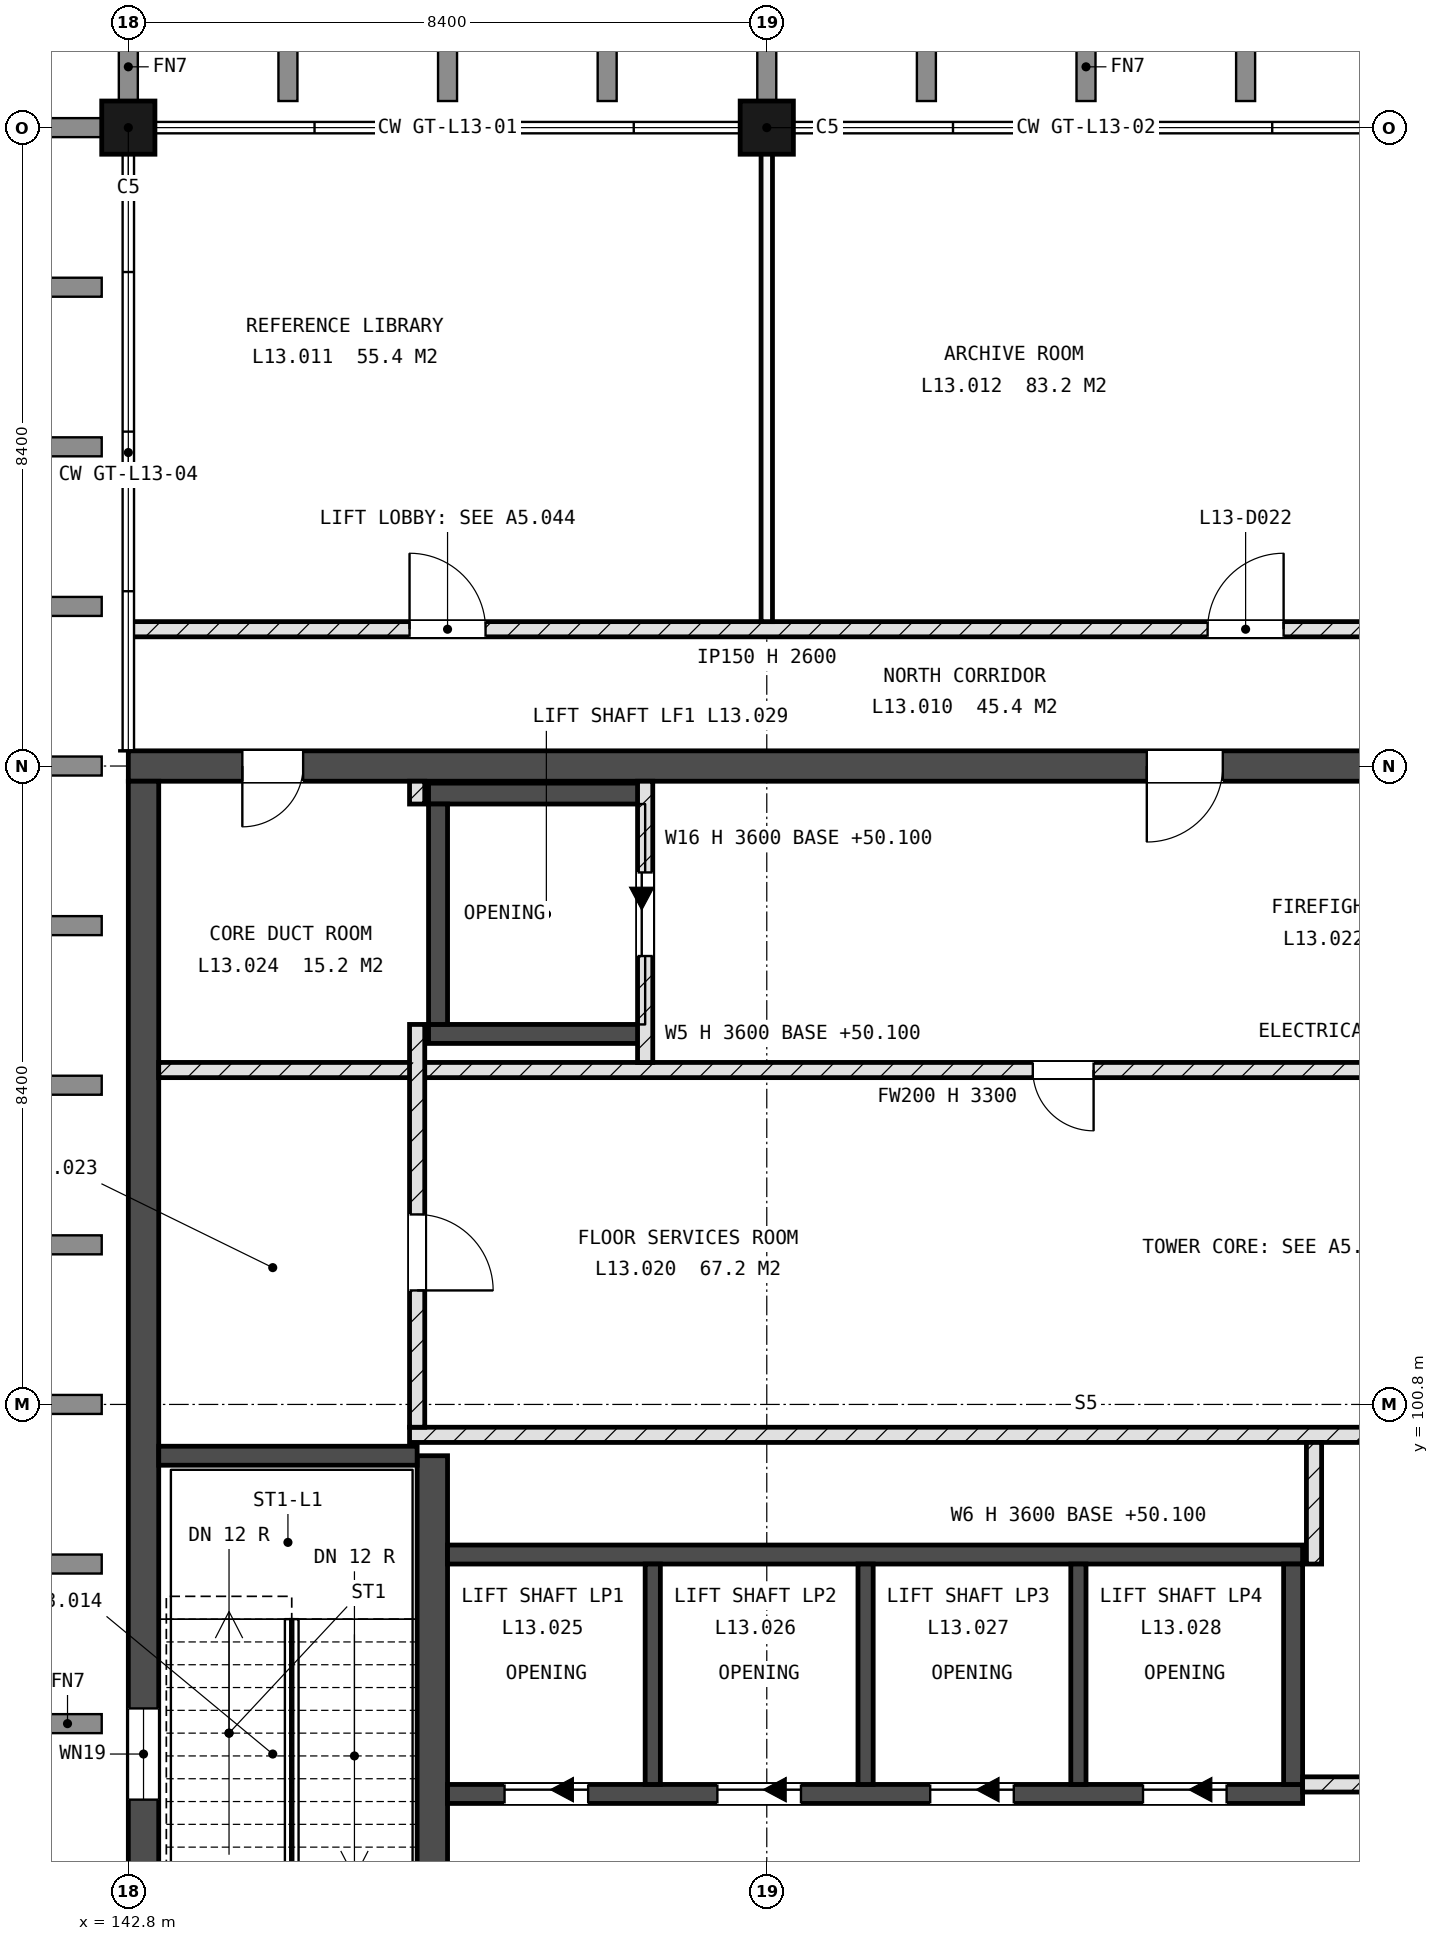
"""IFC4 building model, lengths in metres.
Left out: names, types, materials, properties, quantities, classifications, styles, units other than length and angle.
Written with IfcOpenShell. Run it as: python <this file> out.ifc"""

import sys

from ifc_helpers import new_model, si_unit, direction, frame, frame_2d, origin, origin_2d, place, context, subcontext, project, spatial, rectangle, extrude, element, fill, save


model = new_model("IFC4")
c1 = context("Model", 3, precision=1e-05, world=origin(), true_north=direction((0.0, 1.0)))
c2 = subcontext(c1, "Body", "Model", "MODEL_VIEW")
j1 = project(units=[si_unit("LENGTHUNIT", "METRE"), si_unit("PLANEANGLEUNIT", "RADIAN")], contexts=[c1])
p1 = place(None, origin())
s1 = spatial("IfcSite", under=j1, at=p1, CompositionType="ELEMENT")
p2 = place(p1, origin())
s2 = spatial("IfcBuilding", under=s1, at=p2, CompositionType="ELEMENT")
p3 = place(p2, frame((0.0, 0.0, 50.4)))
s3 = spatial("IfcBuildingStorey", under=s2, at=p3, CompositionType="ELEMENT", Elevation=50.4)
for number, where, z_axis, x_axis in (
    (1, (142.8, 117.6, -0.3), (0.0, 0.0, 1.0), (1.0, 0.0, 0.0)),
    (2, (151.2, 117.6, -0.3), (0.0, 0.0, 1.0), (1.0, 0.0, 0.0)),
):
    element("IfcColumn", number, at=place(p3, frame(where, z_axis=z_axis, x_axis=x_axis)), inside=s3, PredefinedType="COLUMN", context=c2, shape_type="SweptSolid", body=[
        extrude(rectangle(XDim=0.7, YDim=0.7, at=origin_2d()), origin(), (0.0, 0.0, 1.0), 3.6),
    ])
p4 = place(p3, frame((142.8, 109.2, -0.3), z_axis=(0.0, 0.0, 1.0), x_axis=(1.0, 0.0, 0.0)))
e3 = element("IfcWall", 3, at=p4, inside=s3, PredefinedType="SHEAR", context=c2, shape_type="SweptSolid", body=[
    extrude(rectangle(XDim=25.2, YDim=0.4, at=frame_2d((12.6, 0.0))), origin(), (0.0, 0.0, 1.0), 3.6),
])
p5 = place(p4, frame((22.8, 0.0, 0.3)))
e4 = element("IfcOpeningElement", 4, at=p5, cuts=e3, PredefinedType="OPENING", context=c2, shape_type="SweptSolid", body=[
    extrude(rectangle(XDim=1.0, YDim=2.1, at=frame_2d((0.5, 1.05))), frame((0.0, 0.21, 0.0), z_axis=(0.0, -1.0, 0.0), x_axis=(1.0, 0.0, 0.0)), (0.0, 0.0, 1.0), 0.42),
])
p6 = place(p4, frame((1.5, 0.0, 0.3)))
e5 = element("IfcOpeningElement", 5, at=p6, cuts=e3, PredefinedType="OPENING", context=c2, shape_type="SweptSolid", body=[
    extrude(rectangle(XDim=0.8, YDim=2.1, at=frame_2d((0.4, 1.05))), frame((0.0, 0.21, 0.0), z_axis=(0.0, -1.0, 0.0), x_axis=(1.0, 0.0, 0.0)), (0.0, 0.0, 1.0), 0.42),
])
p7 = place(p4, frame((13.4, 0.0, 0.3)))
e6 = element("IfcOpeningElement", 6, at=p7, cuts=e3, PredefinedType="OPENING", context=c2, shape_type="SweptSolid", body=[
    extrude(rectangle(XDim=1.0, YDim=2.1, at=frame_2d((0.5, 1.05))), frame((0.0, 0.21, 0.0), z_axis=(0.0, -1.0, 0.0), x_axis=(1.0, 0.0, 0.0)), (0.0, 0.0, 1.0), 0.42),
])
p8 = place(p3, frame((143.0, 92.6, -0.3), z_axis=(0.0, 0.0, 1.0), x_axis=(0.0, 1.0, 0.0)))
e7 = element("IfcWall", 7, at=p8, inside=s3, PredefinedType="SHEAR", context=c2, shape_type="SweptSolid", body=[
    extrude(rectangle(XDim=16.4, YDim=0.4, at=frame_2d((8.2, 0.0))), origin(), (0.0, 0.0, 1.0), 3.6),
])
p9 = place(p8, frame((3.0, 0.0, 1.9)))
e8 = element("IfcOpeningElement", 8, at=p9, cuts=e7, PredefinedType="OPENING", context=c2, shape_type="SweptSolid", body=[
    extrude(rectangle(XDim=1.2, YDim=0.9, at=frame_2d((0.6, 0.45))), frame((0.0, 0.21, 0.0), z_axis=(0.0, -1.0, 0.0), x_axis=(1.0, 0.0, 0.0)), (0.0, 0.0, 1.0), 0.42),
])
p10 = place(p3, frame((146.8, 92.6, -0.3), z_axis=(0.0, 0.0, 1.0), x_axis=(0.0, 1.0, 0.0)))
e9 = element("IfcWall", 9, at=p10, inside=s3, PredefinedType="SHEAR", context=c2, shape_type="SweptSolid", body=[
    extrude(rectangle(XDim=7.525, YDim=0.4, at=frame_2d((3.762, 0.0))), origin(), (0.0, 0.0, 1.0), 3.6),
])
p11 = place(p10, frame((0.1, 0.0, 0.3)))
e10 = element("IfcOpeningElement", 10, at=p11, cuts=e9, PredefinedType="OPENING", context=c2, shape_type="SweptSolid", body=[
    extrude(rectangle(XDim=1.0, YDim=2.1, at=frame_2d((0.5, 1.05))), frame((0.0, 0.21, 0.0), z_axis=(0.0, -1.0, 0.0), x_axis=(1.0, 0.0, 0.0)), (0.0, 0.0, 1.0), 0.42),
])
p12 = place(p3, frame((143.2, 100.125, -0.3), z_axis=(0.0, 0.0, 1.0), x_axis=(1.0, 0.0, 0.0)))
e11 = element("IfcWall", 11, at=p12, inside=s3, PredefinedType="SHEAR", context=c2, shape_type="SweptSolid", body=[
    extrude(rectangle(XDim=3.4, YDim=0.25, at=frame_2d((1.7, 0.0))), origin(), (0.0, 0.0, 1.0), 3.6),
])
p13 = place(p3, frame((147.0, 95.675, -0.3), z_axis=(0.0, 0.0, 1.0), x_axis=(1.0, 0.0, 0.0)))
e12 = element("IfcWall", 12, at=p13, inside=s3, PredefinedType="SHEAR", context=c2, shape_type="SweptSolid", body=[
    extrude(rectangle(XDim=11.25, YDim=0.25, at=frame_2d((5.625, 0.0))), origin(), (0.0, 0.0, 1.0), 3.6),
])
p14 = place(p13, frame((0.75, 0.0, 0.3)))
e13 = element("IfcOpeningElement", 13, at=p14, cuts=e12, PredefinedType="OPENING", context=c2, shape_type="SweptSolid", body=[
    extrude(rectangle(XDim=1.1, YDim=2.1, at=frame_2d((0.55, 1.05))), frame((0.0, 0.135, 0.0), z_axis=(0.0, -1.0, 0.0), x_axis=(1.0, 0.0, 0.0)), (0.0, 0.0, 1.0), 0.27),
])
p15 = place(p13, frame((3.55, 0.0, 0.3)))
e14 = element("IfcOpeningElement", 14, at=p15, cuts=e12, PredefinedType="OPENING", context=c2, shape_type="SweptSolid", body=[
    extrude(rectangle(XDim=1.1, YDim=2.1, at=frame_2d((0.55, 1.05))), frame((0.0, 0.135, 0.0), z_axis=(0.0, -1.0, 0.0), x_axis=(1.0, 0.0, 0.0)), (0.0, 0.0, 1.0), 0.27),
])
p16 = place(p13, frame((6.35, 0.0, 0.3)))
e15 = element("IfcOpeningElement", 15, at=p16, cuts=e12, PredefinedType="OPENING", context=c2, shape_type="SweptSolid", body=[
    extrude(rectangle(XDim=1.1, YDim=2.1, at=frame_2d((0.55, 1.05))), frame((0.0, 0.135, 0.0), z_axis=(0.0, -1.0, 0.0), x_axis=(1.0, 0.0, 0.0)), (0.0, 0.0, 1.0), 0.27),
])
p17 = place(p13, frame((9.15, 0.0, 0.3)))
e16 = element("IfcOpeningElement", 16, at=p17, cuts=e12, PredefinedType="OPENING", context=c2, shape_type="SweptSolid", body=[
    extrude(rectangle(XDim=1.1, YDim=2.1, at=frame_2d((0.55, 1.05))), frame((0.0, 0.135, 0.0), z_axis=(0.0, -1.0, 0.0), x_axis=(1.0, 0.0, 0.0)), (0.0, 0.0, 1.0), 0.27),
])
p18 = place(p3, frame((147.0, 98.825, -0.3), z_axis=(0.0, 0.0, 1.0), x_axis=(1.0, 0.0, 0.0)))
e17 = element("IfcWall", 17, at=p18, inside=s3, PredefinedType="SHEAR", context=c2, shape_type="SweptSolid", body=[
    extrude(rectangle(XDim=11.25, YDim=0.25, at=frame_2d((5.625, 0.0))), origin(), (0.0, 0.0, 1.0), 3.6),
])
p19 = place(p3, frame((158.125, 95.8, -0.3), z_axis=(0.0, 0.0, 1.0), x_axis=(0.0, 1.0, 0.0)))
e18 = element("IfcWall", 18, at=p19, inside=s3, PredefinedType="SHEAR", context=c2, shape_type="SweptSolid", body=[
    extrude(rectangle(XDim=2.9, YDim=0.25, at=frame_2d((1.45, 0.0))), origin(), (0.0, 0.0, 1.0), 3.6),
])
for number, where, z_axis, x_axis in (
    (19, (149.7, 95.8, -0.3), (0.0, 0.0, 1.0), (0.0, 1.0, 0.0)),
    (20, (152.5, 95.8, -0.3), (0.0, 0.0, 1.0), (0.0, 1.0, 0.0)),
    (21, (155.3, 95.8, -0.3), (0.0, 0.0, 1.0), (0.0, 1.0, 0.0)),
):
    element("IfcWall", number, at=place(p3, frame(where, z_axis=z_axis, x_axis=x_axis)), inside=s3, PredefinedType="SHEAR", context=c2, shape_type="SweptSolid", body=[
        extrude(rectangle(XDim=2.9, YDim=0.2, at=frame_2d((1.45, 0.0))), origin(), (0.0, 0.0, 1.0), 3.6),
    ])
p20 = place(p3, frame((146.75, 105.675, -0.3), z_axis=(0.0, 0.0, 1.0), x_axis=(1.0, 0.0, 0.0)))
e22 = element("IfcWall", 22, at=p20, inside=s3, PredefinedType="SHEAR", context=c2, shape_type="SweptSolid", body=[
    extrude(rectangle(XDim=2.85, YDim=0.25, at=frame_2d((1.425, 0.0))), origin(), (0.0, 0.0, 1.0), 3.6),
])
p21 = place(p3, frame((146.75, 108.837, -0.3), z_axis=(0.0, 0.0, 1.0), x_axis=(1.0, 0.0, 0.0)))
e23 = element("IfcWall", 23, at=p21, inside=s3, PredefinedType="SHEAR", context=c2, shape_type="SweptSolid", body=[
    extrude(rectangle(XDim=2.85, YDim=0.275, at=frame_2d((1.425, 0.0))), origin(), (0.0, 0.0, 1.0), 3.6),
])
p22 = place(p3, frame((146.875, 105.8, -0.3), z_axis=(0.0, 0.0, 1.0), x_axis=(0.0, 1.0, 0.0)))
e24 = element("IfcWall", 24, at=p22, inside=s3, PredefinedType="SHEAR", context=c2, shape_type="SweptSolid", body=[
    extrude(rectangle(XDim=2.9, YDim=0.25, at=frame_2d((1.45, 0.0))), origin(), (0.0, 0.0, 1.0), 3.6),
])
p23 = place(p3, frame((158.25, 95.8, 0.0), z_axis=(0.0, 0.0, 1.0), x_axis=(1.0, 0.0, 0.0)))
e25 = element("IfcWall", 25, at=p23, inside=s3, PredefinedType="SOLIDWALL", context=c2, shape_type="SweptSolid", body=[
    extrude(rectangle(XDim=2.25, YDim=0.2, at=frame_2d((1.125, 0.0))), origin(), (0.0, 0.0, 1.0), 3.3),
])
p24 = place(p3, frame((146.5, 100.4, 0.0), z_axis=(0.0, 0.0, 1.0), x_axis=(1.0, 0.0, 0.0)))
e26 = element("IfcWall", 26, at=p24, inside=s3, PredefinedType="SOLIDWALL", context=c2, shape_type="SweptSolid", body=[
    extrude(rectangle(XDim=14.0, YDim=0.2, at=frame_2d((7.0, 0.0))), origin(), (0.0, 0.0, 1.0), 3.3),
])
p25 = place(p3, frame((143.2, 105.2, 0.0), z_axis=(0.0, 0.0, 1.0), x_axis=(1.0, 0.0, 0.0)))
e27 = element("IfcWall", 27, at=p25, inside=s3, PredefinedType="SOLIDWALL", context=c2, shape_type="SweptSolid", body=[
    extrude(rectangle(XDim=20.75, YDim=0.2, at=frame_2d((10.375, 0.0))), origin(), (0.0, 0.0, 1.0), 3.3),
])
p26 = place(p25, frame((11.5, 0.0, 0.0)))
e28 = element("IfcOpeningElement", 28, at=p26, cuts=e27, PredefinedType="OPENING", context=c2, shape_type="SweptSolid", body=[
    extrude(rectangle(XDim=0.8, YDim=2.1, at=frame_2d((0.4, 1.05))), frame((0.0, 0.11, 0.0), z_axis=(0.0, -1.0, 0.0), x_axis=(1.0, 0.0, 0.0)), (0.0, 0.0, 1.0), 0.22),
])
p27 = place(p25, frame((18.8, 0.0, 0.0)))
e29 = element("IfcOpeningElement", 29, at=p27, cuts=e27, PredefinedType="OPENING", context=c2, shape_type="SweptSolid", body=[
    extrude(rectangle(XDim=1.0, YDim=2.1, at=frame_2d((0.5, 1.05))), frame((0.0, 0.11, 0.0), z_axis=(0.0, -1.0, 0.0), x_axis=(1.0, 0.0, 0.0)), (0.0, 0.0, 1.0), 0.22),
])
p28 = place(p3, frame((142.8, 111.0, 0.0), z_axis=(0.0, 0.0, 1.0), x_axis=(1.0, 0.0, 0.0)))
e30 = element("IfcWall", 30, at=p28, inside=s3, PredefinedType="SOLIDWALL", context=c2, shape_type="SweptSolid", body=[
    extrude(rectangle(XDim=25.2, YDim=0.2, at=frame_2d((12.6, 0.0))), origin(), (0.0, 0.0, 1.0), 3.3),
])
p29 = place(p28, frame((3.7, 0.0, 0.0)))
e31 = element("IfcOpeningElement", 31, at=p29, cuts=e30, PredefinedType="OPENING", context=c2, shape_type="SweptSolid", body=[
    extrude(rectangle(XDim=1.0, YDim=2.1, at=frame_2d((0.5, 1.05))), frame((0.0, 0.11, 0.0), z_axis=(0.0, -1.0, 0.0), x_axis=(1.0, 0.0, 0.0)), (0.0, 0.0, 1.0), 0.22),
])
p30 = place(p28, frame((14.2, 0.0, 0.0)))
e32 = element("IfcOpeningElement", 32, at=p30, cuts=e30, PredefinedType="OPENING", context=c2, shape_type="SweptSolid", body=[
    extrude(rectangle(XDim=1.0, YDim=2.1, at=frame_2d((0.5, 1.05))), frame((0.0, 0.11, 0.0), z_axis=(0.0, -1.0, 0.0), x_axis=(1.0, 0.0, 0.0)), (0.0, 0.0, 1.0), 0.22),
])
p31 = place(p28, frame((22.6, 0.0, 0.0)))
e33 = element("IfcOpeningElement", 33, at=p31, cuts=e30, PredefinedType="OPENING", context=c2, shape_type="SweptSolid", body=[
    extrude(rectangle(XDim=1.0, YDim=2.1, at=frame_2d((0.5, 1.05))), frame((0.0, 0.11, 0.0), z_axis=(0.0, -1.0, 0.0), x_axis=(1.0, 0.0, 0.0)), (0.0, 0.0, 1.0), 0.22),
])
p32 = place(p3, frame((146.6, 100.5, 0.0), z_axis=(0.0, 0.0, 1.0), x_axis=(0.0, 1.0, 0.0)))
e34 = element("IfcWall", 34, at=p32, inside=s3, PredefinedType="SOLIDWALL", context=c2, shape_type="SweptSolid", body=[
    extrude(rectangle(XDim=5.3, YDim=0.2, at=frame_2d((2.65, 0.0))), origin(), (0.0, 0.0, 1.0), 3.3),
])
p33 = place(p32, frame((1.8, 0.0, 0.0)))
e35 = element("IfcOpeningElement", 35, at=p33, cuts=e34, PredefinedType="OPENING", context=c2, shape_type="SweptSolid", body=[
    extrude(rectangle(XDim=1.0, YDim=2.1, at=frame_2d((0.5, 1.05))), frame((0.0, 0.11, 0.0), z_axis=(0.0, -1.0, 0.0), x_axis=(1.0, 0.0, 0.0)), (0.0, 0.0, 1.0), 0.22),
])
p34 = place(p3, frame((146.6, 108.7, 0.0), z_axis=(0.0, 0.0, 1.0), x_axis=(0.0, 1.0, 0.0)))
e36 = element("IfcWall", 36, at=p34, inside=s3, PredefinedType="SOLIDWALL", context=c2, shape_type="SweptSolid", body=[
    extrude(rectangle(XDim=0.3, YDim=0.2, at=frame_2d((0.15, 0.0))), origin(), (0.0, 0.0, 1.0), 3.3),
])
p35 = place(p3, frame((149.6, 105.3, 0.0), z_axis=(0.0, 0.0, 1.0), x_axis=(0.0, 1.0, 0.0)))
e37 = element("IfcWall", 37, at=p35, inside=s3, PredefinedType="SOLIDWALL", context=c2, shape_type="SweptSolid", body=[
    extrude(rectangle(XDim=3.7, YDim=0.2, at=frame_2d((1.85, 0.0))), origin(), (0.0, 0.0, 1.0), 3.3),
])
p36 = place(p35, frame((1.4, 0.0, 0.0)))
e38 = element("IfcOpeningElement", 38, at=p36, cuts=e37, PredefinedType="OPENING", context=c2, shape_type="SweptSolid", body=[
    extrude(rectangle(XDim=1.1, YDim=2.1, at=frame_2d((0.55, 1.05))), frame((0.0, 0.11, 0.0), z_axis=(0.0, -1.0, 0.0), x_axis=(1.0, 0.0, 0.0)), (0.0, 0.0, 1.0), 0.22),
])
p37 = place(p3, frame((151.2, 111.1, 0.0), z_axis=(0.0, 0.0, 1.0), x_axis=(0.0, 1.0, 0.0)))
e39 = element("IfcWall", 39, at=p37, inside=s3, PredefinedType="PARTITIONING", context=c2, shape_type="SweptSolid", body=[
    extrude(rectangle(XDim=6.5, YDim=0.15, at=frame_2d((3.25, 0.0))), origin(), (0.0, 0.0, 1.0), 2.6),
])
p38 = place(p3, frame((158.4, 98.7, 0.0), z_axis=(0.0, 0.0, 1.0), x_axis=(0.0, 1.0, 0.0)))
e40 = element("IfcWall", 40, at=p38, inside=s3, PredefinedType="SOLIDWALL", context=c2, shape_type="SweptSolid", body=[
    extrude(rectangle(XDim=1.6, YDim=0.2, at=frame_2d((0.8, 0.0))), origin(), (0.0, 0.0, 1.0), 3.3),
])
p39 = place(p9, origin())
e41 = element("IfcWindow", 41, at=p39, inside=s3, PartitioningType="SINGLE_PANEL", PredefinedType="WINDOW", context=c2, shape_type="SweptSolid", body=[
    extrude(rectangle(XDim=1.2, YDim=0.9, at=frame_2d((0.6, 0.45))), frame((0.0, 0.03, 0.0), z_axis=(0.0, -1.0, 0.0), x_axis=(1.0, 0.0, 0.0)), (0.0, 0.0, 1.0), 0.06),
])
fill(e8, e41)
p40 = place(p14, origin())
e42 = element("IfcDoor", 42, at=p40, inside=s3, OperationType="SLIDING_TO_LEFT", PredefinedType="DOOR", context=c2, shape_type="SweptSolid", body=[
    extrude(rectangle(XDim=1.1, YDim=2.1, at=frame_2d((0.55, 1.05))), frame((0.0, 0.025, 0.0), z_axis=(0.0, -1.0, 0.0), x_axis=(1.0, 0.0, 0.0)), (0.0, 0.0, 1.0), 0.05),
])
fill(e13, e42)
p41 = place(p15, origin())
e43 = element("IfcDoor", 43, at=p41, inside=s3, OperationType="SLIDING_TO_LEFT", PredefinedType="DOOR", context=c2, shape_type="SweptSolid", body=[
    extrude(rectangle(XDim=1.1, YDim=2.1, at=frame_2d((0.55, 1.05))), frame((0.0, 0.025, 0.0), z_axis=(0.0, -1.0, 0.0), x_axis=(1.0, 0.0, 0.0)), (0.0, 0.0, 1.0), 0.05),
])
fill(e14, e43)
p42 = place(p16, origin())
e44 = element("IfcDoor", 44, at=p42, inside=s3, OperationType="SLIDING_TO_LEFT", PredefinedType="DOOR", context=c2, shape_type="SweptSolid", body=[
    extrude(rectangle(XDim=1.1, YDim=2.1, at=frame_2d((0.55, 1.05))), frame((0.0, 0.025, 0.0), z_axis=(0.0, -1.0, 0.0), x_axis=(1.0, 0.0, 0.0)), (0.0, 0.0, 1.0), 0.05),
])
fill(e15, e44)
p43 = place(p17, origin())
e45 = element("IfcDoor", 45, at=p43, inside=s3, OperationType="SLIDING_TO_LEFT", PredefinedType="DOOR", context=c2, shape_type="SweptSolid", body=[
    extrude(rectangle(XDim=1.1, YDim=2.1, at=frame_2d((0.55, 1.05))), frame((0.0, 0.025, 0.0), z_axis=(0.0, -1.0, 0.0), x_axis=(1.0, 0.0, 0.0)), (0.0, 0.0, 1.0), 0.05),
])
fill(e16, e45)
p44 = place(p36, origin())
e46 = element("IfcDoor", 46, at=p44, inside=s3, OperationType="SLIDING_TO_LEFT", PredefinedType="DOOR", context=c2, shape_type="SweptSolid", body=[
    extrude(rectangle(XDim=1.1, YDim=2.1, at=frame_2d((0.55, 1.05))), frame((0.0, 0.025, 0.0), z_axis=(0.0, -1.0, 0.0), x_axis=(1.0, 0.0, 0.0)), (0.0, 0.0, 1.0), 0.05),
])
fill(e38, e46)
p45 = place(p29, origin())
e47 = element("IfcDoor", 47, at=p45, inside=s3, OperationType="SINGLE_SWING_RIGHT", PredefinedType="DOOR", context=c2, shape_type="SweptSolid", body=[
    extrude(rectangle(XDim=1.0, YDim=2.1, at=frame_2d((0.5, 1.05))), frame((0.0, 0.025, 0.0), z_axis=(0.0, -1.0, 0.0), x_axis=(1.0, 0.0, 0.0)), (0.0, 0.0, 1.0), 0.05),
])
fill(e31, e47)
p46 = place(p30, origin())
e48 = element("IfcDoor", 48, at=p46, inside=s3, OperationType="SINGLE_SWING_LEFT", PredefinedType="DOOR", context=c2, shape_type="SweptSolid", body=[
    extrude(rectangle(XDim=1.0, YDim=2.1, at=frame_2d((0.5, 1.05))), frame((0.0, 0.025, 0.0), z_axis=(0.0, -1.0, 0.0), x_axis=(1.0, 0.0, 0.0)), (0.0, 0.0, 1.0), 0.05),
])
fill(e32, e48)
p47 = place(p26, origin())
e49 = element("IfcDoor", 49, at=p47, inside=s3, OperationType="SINGLE_SWING_RIGHT", PredefinedType="DOOR", context=c2, shape_type="SweptSolid", body=[
    extrude(rectangle(XDim=0.8, YDim=2.1, at=frame_2d((0.4, 1.05))), frame((0.0, 0.025, 0.0), z_axis=(0.0, -1.0, 0.0), x_axis=(1.0, 0.0, 0.0)), (0.0, 0.0, 1.0), 0.05),
])
fill(e28, e49)
p48 = place(p33, origin())
e50 = element("IfcDoor", 50, at=p48, inside=s3, OperationType="SINGLE_SWING_LEFT", PredefinedType="DOOR", context=c2, shape_type="SweptSolid", body=[
    extrude(rectangle(XDim=1.0, YDim=2.1, at=frame_2d((0.5, 1.05))), frame((0.0, 0.025, 0.0), z_axis=(0.0, -1.0, 0.0), x_axis=(1.0, 0.0, 0.0)), (0.0, 0.0, 1.0), 0.05),
])
fill(e35, e50)
p49 = place(p6, origin())
e51 = element("IfcDoor", 51, at=p49, inside=s3, OperationType="SINGLE_SWING_LEFT", PredefinedType="DOOR", context=c2, shape_type="SweptSolid", body=[
    extrude(rectangle(XDim=0.8, YDim=2.1, at=frame_2d((0.4, 1.05))), frame((0.0, 0.025, 0.0), z_axis=(0.0, -1.0, 0.0), x_axis=(1.0, 0.0, 0.0)), (0.0, 0.0, 1.0), 0.05),
])
fill(e5, e51)
p50 = place(p7, origin())
e52 = element("IfcDoor", 52, at=p50, inside=s3, OperationType="SINGLE_SWING_LEFT", PredefinedType="DOOR", context=c2, shape_type="SweptSolid", body=[
    extrude(rectangle(XDim=1.0, YDim=2.1, at=frame_2d((0.5, 1.05))), frame((0.0, 0.025, 0.0), z_axis=(0.0, -1.0, 0.0), x_axis=(1.0, 0.0, 0.0)), (0.0, 0.0, 1.0), 0.05),
])
fill(e6, e52)
save(model, sys.argv[1])
